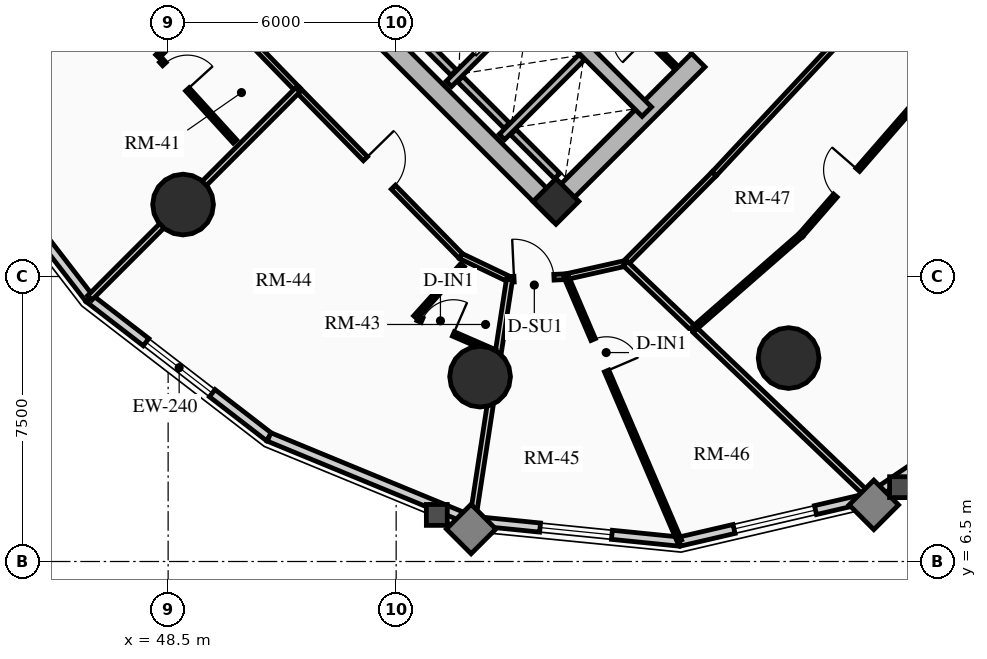
"""IFC4 building model, lengths in metres.
Left out: names, types, materials, properties, quantities, classifications, styles, units other than length and angle.
Written with IfcOpenShell. Run it as: python <this file> out.ifc"""

import sys

from ifc_helpers import new_model, si_unit, direction, frame, frame_2d, origin, origin_2d, place, context, subcontext, project, spatial, rectangle, circle, extrude, source, transform, mapped, element, fill, save


model = new_model("IFC4")
c1 = context("Model", 3, precision=1e-05, world=origin(), true_north=direction((0.0, 1.0)))
c2 = subcontext(c1, "Body", "Model", "MODEL_VIEW")
j1 = project(units=[si_unit("LENGTHUNIT", "METRE"), si_unit("PLANEANGLEUNIT", "RADIAN")], contexts=[c1])
p1 = place(None, origin())
s1 = spatial("IfcSite", under=j1, at=p1, CompositionType="ELEMENT")
p2 = place(p1, origin())
s2 = spatial("IfcBuilding", under=s1, at=p2, CompositionType="ELEMENT")
p3 = place(p2, frame((0.0, 0.0, 48.19)))
s3 = spatial("IfcBuildingStorey", under=s2, at=p3, CompositionType="ELEMENT", Elevation=48.19)
p4 = place(p3, frame((58.773, 15.661, 0.0), z_axis=(0.0, 0.0, 1.0), x_axis=(-0.707106781187, 0.707106781187, 0.0)))
e1 = element("IfcWall", 1, at=p4, inside=s3, PredefinedType="SHEAR", context=c2, shape_type="SweptSolid", body=[
    extrude(rectangle(XDim=14.3, YDim=0.5, at=frame_2d((7.15, 0.0))), origin(), (0.0, 0.0, 1.0), 2.91),
])
p5 = place(p3, frame((58.596, 15.838, 0.0), z_axis=(0.0, 0.0, 1.0), x_axis=(0.707106781187, 0.707106781187, 0.0)))
e2 = element("IfcWall", 2, at=p5, inside=s3, PredefinedType="SHEAR", context=c2, shape_type="SweptSolid", body=[
    extrude(rectangle(XDim=10.7, YDim=0.5, at=frame_2d((5.35, 0.0))), origin(), (0.0, 0.0, 1.0), 2.91),
])
m1 = source(origin(), c2, "Body", "SweptSolid", [
    extrude(rectangle(XDim=1.5, YDim=2.02, at=frame_2d((0.75, 1.01))), frame((0.0, 0.26, 0.0), z_axis=(0.0, -1.0, 0.0), x_axis=(1.0, 0.0, 0.0)), (0.0, 0.0, 1.0), 0.52),
])
p6 = place(p5, frame((5.45, 0.0, 0.0)))
e3 = element("IfcOpeningElement", 3, at=p6, cuts=e2, PredefinedType="OPENING", context=c2, shape_type="MappedRepresentation", body=[
    mapped(m1, transform((0.0, 0.0, 0.0), x_axis=(1.0, 0.0, 0.0), y_axis=(0.0, 1.0, 0.0), z_axis=(0.0, 0.0, 1.0), scale=1.0)),
])
p7 = place(p3, frame((61.096, 18.338, 0.0), z_axis=(0.0, 0.0, 1.0), x_axis=(-0.707106781187, 0.707106781187, 0.0)))
e4 = element("IfcWall", 4, at=p7, inside=s3, PredefinedType="SHEAR", context=c2, shape_type="SweptSolid", body=[
    extrude(rectangle(XDim=13.8, YDim=0.35, at=frame_2d((6.9, 0.0))), origin(), (0.0, 0.0, 1.0), 2.91),
])
m2 = source(origin(), c2, "Body", "SweptSolid", [
    extrude(rectangle(XDim=1.1, YDim=2.015, at=frame_2d((0.55, 1.007))), frame((0.0, 0.185, 0.0), z_axis=(0.0, -1.0, 0.0), x_axis=(1.0, 0.0, 0.0)), (0.0, 0.0, 1.0), 0.37),
])
p8 = place(p7, frame((4.9, 0.0, 0.0)))
e5 = element("IfcOpeningElement", 5, at=p8, cuts=e4, PredefinedType="OPENING", context=c2, shape_type="MappedRepresentation", body=[
    mapped(m2, transform((0.0, 0.0, 0.0), x_axis=(1.0, 0.0, 0.0), y_axis=(0.0, 1.0, 0.0), z_axis=(0.0, 0.0, 1.0), scale=1.0)),
])
m3 = source(origin(), c2, "Body", "SweptSolid", [
    extrude(rectangle(XDim=1.15, YDim=2.02, at=frame_2d((0.575, 1.01))), frame((0.0, 0.185, 0.0), z_axis=(0.0, -1.0, 0.0), x_axis=(1.0, 0.0, 0.0)), (0.0, 0.0, 1.0), 0.37),
])
p9 = place(p7, frame((7.32, 0.0, 0.0)))
e6 = element("IfcOpeningElement", 6, at=p9, cuts=e4, PredefinedType="OPENING", context=c2, shape_type="MappedRepresentation", body=[
    mapped(m3, transform((0.0, 0.0, 0.0), x_axis=(1.0, 0.0, 0.0), y_axis=(0.0, 1.0, 0.0), z_axis=(0.0, 0.0, 1.0), scale=1.0)),
])
p10 = place(p3, frame((58.706, 15.976, 0.0), z_axis=(0.0, 0.0, 1.0), x_axis=(0.707106781187, 0.707106781187, 0.0)))
e7 = element("IfcColumn", 7, at=p10, inside=s3, PredefinedType="COLUMN", context=c2, shape_type="SweptSolid", body=[
    extrude(rectangle(XDim=0.85, YDim=0.85, at=origin_2d()), origin(), (0.0, 0.0, 1.0), 2.91),
])
for number, where, z_axis, x_axis in (
    (8, (48.893, 15.893, 0.0), (0.0, 0.0, 1.0), (1.0, 0.0, 0.0)),
    (9, (56.709, 11.365, 0.0), (0.0, 0.0, 1.0), (1.0, 0.0, 0.0)),
    (10, (64.827, 11.854, 0.0), (0.0, 0.0, 1.0), (1.0, 0.0, 0.0)),
):
    element("IfcColumn", number, at=place(p3, frame(where, z_axis=z_axis, x_axis=x_axis)), inside=s3, PredefinedType="USERDEFINED", context=c2, shape_type="SweptSolid", body=[
        extrude(circle(Radius=0.8, at=origin_2d()), origin(), (0.0, 0.0, 1.0), 2.91),
    ])
p11 = place(p3, frame((46.425, 13.425, 0.0), z_axis=(0.0, 0.0, 1.0), x_axis=(-0.610502519057, 0.792014314407, 0.0)))
e11 = element("IfcWall", 11, at=p11, inside=s3, PredefinedType="SOLIDWALL", context=c2, shape_type="SweptSolid", body=[
    extrude(rectangle(XDim=5.973, YDim=0.24, at=frame_2d((2.987, 0.0))), origin(), (0.0, 0.0, 1.0), 2.073),
])
p12 = place(p3, frame((51.156, 9.778, 0.0), z_axis=(0.0, 0.0, 1.0), x_axis=(-0.792014314407, 0.610502519057, 0.0)))
e12 = element("IfcWall", 12, at=p12, inside=s3, PredefinedType="SOLIDWALL", context=c2, shape_type="SweptSolid", body=[
    extrude(rectangle(XDim=5.973, YDim=0.24, at=frame_2d((2.987, 0.0))), origin(), (0.0, 0.0, 1.0), 2.073),
])
m4 = source(origin(), c2, "Body", "SweptSolid", [
    extrude(rectangle(XDim=2.2, YDim=1.35, at=frame_2d((1.1, 0.675))), frame((0.0, 0.13, 0.0), z_axis=(0.0, -1.0, 0.0), x_axis=(1.0, 0.0, 0.0)), (0.0, 0.0, 1.0), 0.26),
])
p13 = place(p12, frame((1.887, 0.0, 0.65)))
e13 = element("IfcOpeningElement", 13, at=p13, cuts=e12, PredefinedType="OPENING", context=c2, shape_type="MappedRepresentation", body=[
    mapped(m4, transform((0.0, 0.0, 0.0), x_axis=(1.0, 0.0, 0.0), y_axis=(0.0, 1.0, 0.0), z_axis=(0.0, 0.0, 1.0), scale=1.0)),
])
p14 = place(p3, frame((56.507, 7.572, 0.0), z_axis=(0.0, 0.0, 1.0), x_axis=(-0.924563629567, 0.381027682565, 0.0)))
e14 = element("IfcWall", 14, at=p14, inside=s3, PredefinedType="SOLIDWALL", context=c2, shape_type="SweptSolid", body=[
    extrude(rectangle(XDim=5.789, YDim=0.24, at=frame_2d((2.894, 0.0))), origin(), (0.0, 0.0, 1.0), 2.073),
])
p15 = place(p3, frame((61.957, 7.024, 0.0), z_axis=(0.0, 0.0, 1.0), x_axis=(-0.994970765694, 0.100165739718, 0.0)))
e15 = element("IfcWall", 15, at=p15, inside=s3, PredefinedType="SOLIDWALL", context=c2, shape_type="SweptSolid", body=[
    extrude(rectangle(XDim=5.477, YDim=0.24, at=frame_2d((2.738, 0.0))), origin(), (0.0, 0.0, 1.0), 2.073),
])
m5 = source(origin(), c2, "Body", "SweptSolid", [
    extrude(rectangle(XDim=1.9, YDim=1.35, at=frame_2d((0.95, 0.675))), frame((0.0, 0.13, 0.0), z_axis=(0.0, -1.0, 0.0), x_axis=(1.0, 0.0, 0.0)), (0.0, 0.0, 1.0), 0.26),
])
p16 = place(p15, frame((1.788, 0.0, 0.65)))
e16 = element("IfcOpeningElement", 16, at=p16, cuts=e15, PredefinedType="OPENING", context=c2, shape_type="MappedRepresentation", body=[
    mapped(m5, transform((0.0, 0.0, 0.0), x_axis=(1.0, 0.0, 0.0), y_axis=(0.0, 1.0, 0.0), z_axis=(0.0, 0.0, 1.0), scale=1.0)),
])
p17 = place(p3, frame((66.969, 8.186, 0.0), z_axis=(0.0, 0.0, 1.0), x_axis=(-0.974166016949, -0.225833060959, 0.0)))
e17 = element("IfcWall", 17, at=p17, inside=s3, PredefinedType="SOLIDWALL", context=c2, shape_type="SweptSolid", body=[
    extrude(rectangle(XDim=5.146, YDim=0.24, at=frame_2d((2.573, 0.0))), origin(), (0.0, 0.0, 1.0), 2.073),
])
p18 = place(p17, frame((1.473, 0.0, 0.65)))
e18 = element("IfcOpeningElement", 18, at=p18, cuts=e17, PredefinedType="OPENING", context=c2, shape_type="MappedRepresentation", body=[
    mapped(m4, transform((0.0, 0.0, 0.0), x_axis=(1.0, 0.0, 0.0), y_axis=(0.0, 1.0, 0.0), z_axis=(0.0, 0.0, 1.0), scale=1.0)),
])
p19 = place(p3, frame((71.055, 10.945, 0.0), z_axis=(0.0, 0.0, 1.0), x_axis=(-0.828736708604, -0.559638693991, 0.0)))
e19 = element("IfcWall", 19, at=p19, inside=s3, PredefinedType="SOLIDWALL", context=c2, shape_type="SweptSolid", body=[
    extrude(rectangle(XDim=4.93, YDim=0.24, at=frame_2d((2.465, 0.0))), origin(), (0.0, 0.0, 1.0), 2.073),
])
p20 = place(p3, frame((55.888, 19.069, 0.0), z_axis=(0.0, 0.0, 1.0), x_axis=(0.707106781187, 0.707106781187, 0.0)))
e20 = element("IfcWall", 20, at=p20, inside=s3, PredefinedType="SHEAR", context=c2, shape_type="SweptSolid", body=[
    extrude(rectangle(XDim=2.97, YDim=0.2, at=frame_2d((1.485, 0.0))), origin(), (0.0, 0.0, 1.0), 2.91),
])
p21 = place(p3, frame((56.015, 19.366, 0.0), z_axis=(0.0, 0.0, 1.0), x_axis=(-0.707106781187, 0.707106781187, 0.0)))
e21 = element("IfcWall", 21, at=p21, inside=s3, PredefinedType="SHEAR", context=c2, shape_type="SweptSolid", body=[
    extrude(rectangle(XDim=2.44, YDim=0.2, at=frame_2d((1.22, 0.0))), origin(), (0.0, 0.0, 1.0), 2.91),
])
p22 = place(p3, frame((57.284, 17.673, 0.0), z_axis=(0.0, 0.0, 1.0), x_axis=(0.707147878904, 0.70706568108, 0.0)))
e22 = element("IfcWall", 22, at=p22, inside=s3, PredefinedType="SHEAR", context=c2, shape_type="SweptSolid", body=[
    extrude(rectangle(XDim=2.97, YDim=0.2, at=frame_2d((1.485, 0.0))), origin(), (0.0, 0.0, 1.0), 2.91),
])
p23 = place(p3, frame((57.412, 17.97, 0.0), z_axis=(0.0, 0.0, 1.0), x_axis=(-0.707106781187, 0.707106781187, 0.0)))
e23 = element("IfcWall", 23, at=p23, inside=s3, PredefinedType="SHEAR", context=c2, shape_type="SweptSolid", body=[
    extrude(rectangle(XDim=1.735, YDim=0.2, at=frame_2d((0.867, 0.0))), origin(), (0.0, 0.0, 1.0), 2.91),
])
p24 = place(p3, frame((58.737, 16.644, 0.0), z_axis=(0.0, 0.0, 1.0), x_axis=(-0.707032117043, 0.707181437447, 0.0)))
e24 = element("IfcWall", 24, at=p24, inside=s3, PredefinedType="SHEAR", context=c2, shape_type="SweptSolid", body=[
    extrude(rectangle(XDim=1.635, YDim=0.2, at=frame_2d((0.817, 0.0))), origin(), (0.0, 0.0, 1.0), 2.91),
])
p25 = place(p3, frame((61.835, 19.529, 0.0), z_axis=(0.0, 0.0, 1.0), x_axis=(-0.707146413884, 0.707067146267, 0.0)))
e25 = element("IfcWall", 25, at=p25, inside=s3, PredefinedType="PARTITIONING", context=c2, shape_type="SweptSolid", body=[
    extrude(rectangle(XDim=3.08, YDim=0.125, at=frame_2d((1.54, 0.0))), origin(), (0.0, 0.0, 1.0), 2.635),
])
m6 = source(origin(), c2, "Body", "SweptSolid", [
    extrude(rectangle(XDim=0.9, YDim=2.005, at=frame_2d((0.45, 1.002))), frame((0.0, 0.073, 0.0), z_axis=(0.0, -1.0, 0.0), x_axis=(1.0, 0.0, 0.0)), (0.0, 0.0, 1.0), 0.145),
])
p26 = place(p25, frame((1.05, 0.0, 0.0)))
e26 = element("IfcOpeningElement", 26, at=p26, cuts=e25, PredefinedType="OPENING", context=c2, shape_type="MappedRepresentation", body=[
    mapped(m6, transform((0.0, 0.0, 0.0), x_axis=(1.0, 0.0, 0.0), y_axis=(0.0, 1.0, 0.0), z_axis=(0.0, 0.0, 1.0), scale=1.0)),
])
p27 = place(p3, frame((47.729, 23.23, 0.0), z_axis=(0.0, 0.0, 1.0), x_axis=(0.696119834292, -0.717925606386, 0.0)))
e27 = element("IfcWall", 27, at=p27, inside=s3, PredefinedType="PARTITIONING", context=c2, shape_type="SweptSolid", body=[
    extrude(rectangle(XDim=6.012, YDim=0.15, at=frame_2d((3.006, 0.0))), origin(), (0.0, 0.0, 1.0), 2.635),
])
p28 = place(p3, frame((51.914, 18.914, 0.0), z_axis=(0.0, 0.0, 1.0), x_axis=(0.6999614951, -0.71418058317, 0.0)))
e28 = element("IfcWall", 28, at=p28, inside=s3, PredefinedType="PARTITIONING", context=c2, shape_type="SweptSolid", body=[
    extrude(rectangle(XDim=6.13, YDim=0.15, at=frame_2d((3.065, 0.0))), origin(), (0.0, 0.0, 1.0), 2.159),
])
m7 = source(origin(), c2, "Body", "SweptSolid", [
    extrude(rectangle(XDim=1.05, YDim=2.015, at=frame_2d((0.525, 1.007))), frame((0.0, 0.085, 0.0), z_axis=(0.0, -1.0, 0.0), x_axis=(1.0, 0.0, 0.0)), (0.0, 0.0, 1.0), 0.17),
])
p29 = place(p28, frame((2.54, 0.0, 0.0)))
e29 = element("IfcOpeningElement", 29, at=p29, cuts=e28, PredefinedType="OPENING", context=c2, shape_type="MappedRepresentation", body=[
    mapped(m7, transform((0.0, 0.0, 0.0), x_axis=(1.0, 0.0, 0.0), y_axis=(0.0, 1.0, 0.0), z_axis=(0.0, 0.0, 1.0), scale=1.0)),
])
p30 = place(p3, frame((56.204, 14.536, 0.0), z_axis=(0.0, 0.0, 1.0), x_axis=(0.902244982981, -0.431223828986, 0.0)))
e30 = element("IfcWall", 30, at=p30, inside=s3, PredefinedType="PARTITIONING", context=c2, shape_type="SweptSolid", body=[
    extrude(rectangle(XDim=1.417, YDim=0.15, at=frame_2d((0.708, 0.0))), origin(), (0.0, 0.0, 1.0), 2.205),
])
p31 = place(p3, frame((57.483, 13.925, 0.0), z_axis=(0.0, 0.0, 1.0), x_axis=(0.998884345706, 0.047223552414, 0.0)))
e31 = element("IfcWall", 31, at=p31, inside=s3, PredefinedType="PARTITIONING", context=c2, shape_type="SweptSolid", body=[
    extrude(rectangle(XDim=1.494, YDim=0.15, at=frame_2d((0.747, 0.0))), origin(), (0.0, 0.0, 1.0), 2.159),
])
p32 = place(p31, frame((0.12, 0.0, 0.0)))
e32 = element("IfcOpeningElement", 32, at=p32, cuts=e31, PredefinedType="OPENING", context=c2, shape_type="MappedRepresentation", body=[
    mapped(m7, transform((0.0, 0.0, 0.0), x_axis=(1.0, 0.0, 0.0), y_axis=(0.0, 1.0, 0.0), z_axis=(0.0, 0.0, 1.0), scale=1.0)),
])
p33 = place(p3, frame((58.975, 13.996, 0.0), z_axis=(0.0, 0.0, 1.0), x_axis=(0.975700857392, 0.219106907431, 0.0)))
e33 = element("IfcWall", 33, at=p33, inside=s3, PredefinedType="PARTITIONING", context=c2, shape_type="SweptSolid", body=[
    extrude(rectangle(XDim=1.591, YDim=0.15, at=frame_2d((0.795, 0.0))), origin(), (0.0, 0.0, 1.0), 2.205),
])
p34 = place(p3, frame((60.528, 14.344, 0.0), z_axis=(0.0, 0.0, 1.0), x_axis=(0.704381645997, 0.709821454158, 0.0)))
e34 = element("IfcWall", 34, at=p34, inside=s3, PredefinedType="PARTITIONING", context=c2, shape_type="SweptSolid", body=[
    extrude(rectangle(XDim=3.321, YDim=0.15, at=frame_2d((1.661, 0.0))), origin(), (0.0, 0.0, 1.0), 2.159),
])
p35 = place(p3, frame((62.867, 16.702, 0.0), z_axis=(0.0, 0.0, 1.0), x_axis=(0.682449206191, 0.73093302085, 0.0)))
e35 = element("IfcWall", 35, at=p35, inside=s3, PredefinedType="PARTITIONING", context=c2, shape_type="SweptSolid", body=[
    extrude(rectangle(XDim=6.642, YDim=0.15, at=frame_2d((3.321, 0.0))), origin(), (0.0, 0.0, 1.0), 2.159),
])
p36 = place(p3, frame((51.914, 18.914, 0.0), z_axis=(0.0, 0.0, 1.0), x_axis=(-0.707106781187, -0.707106781187, 0.0)))
e36 = element("IfcWall", 36, at=p36, inside=s3, PredefinedType="PARTITIONING", context=c2, shape_type="SweptSolid", body=[
    extrude(rectangle(XDim=7.743, YDim=0.16, at=frame_2d((3.872, 0.0))), origin(), (0.0, 0.0, 1.0), 2.073),
])
p37 = place(p3, frame((57.483, 13.925, 0.0), z_axis=(0.0, 0.0, 1.0), x_axis=(-0.151762268519, -0.988417024264, 0.0)))
e37 = element("IfcWall", 37, at=p37, inside=s3, PredefinedType="PARTITIONING", context=c2, shape_type="SweptSolid", body=[
    extrude(rectangle(XDim=6.407, YDim=0.16, at=frame_2d((3.204, 0.0))), origin(), (0.0, 0.0, 1.0), 2.073),
])
p38 = place(p3, frame((60.528, 14.344, 0.0), z_axis=(0.0, 0.0, 1.0), x_axis=(0.723320016743, -0.690512963947, 0.0)))
e38 = element("IfcWall", 38, at=p38, inside=s3, PredefinedType="PARTITIONING", context=c2, shape_type="SweptSolid", body=[
    extrude(rectangle(XDim=8.893, YDim=0.16, at=frame_2d((4.446, 0.0))), origin(), (0.0, 0.0, 1.0), 2.073),
])
p39 = place(p3, frame((49.498, 21.087, 0.0), z_axis=(0.0, 0.0, 1.0), x_axis=(-0.702129708151, -0.71204906638, 0.0)))
e39 = element("IfcWall", 39, at=p39, inside=s3, PredefinedType="PARTITIONING", context=c2, shape_type="SweptSolid", body=[
    extrude(rectangle(XDim=1.821, YDim=0.125, at=frame_2d((0.911, 0.0))), origin(), (0.0, 0.0, 1.0), 2.635),
])
p40 = place(p3, frame((48.32, 19.68, 0.0), z_axis=(0.0, 0.0, 1.0), x_axis=(0.673403410236, -0.739275217414, 0.0)))
e40 = element("IfcWall", 40, at=p40, inside=s3, PredefinedType="PARTITIONING", context=c2, shape_type="SweptSolid", body=[
    extrude(rectangle(XDim=2.876, YDim=0.125, at=frame_2d((1.438, 0.0))), origin(), (0.0, 0.0, 1.0), 2.635),
])
p41 = place(p40, frame((0.12, 0.0, 0.0)))
e41 = element("IfcOpeningElement", 41, at=p41, cuts=e40, PredefinedType="OPENING", context=c2, shape_type="MappedRepresentation", body=[
    mapped(m6, transform((0.0, 0.0, 0.0), x_axis=(1.0, 0.0, 0.0), y_axis=(0.0, 1.0, 0.0), z_axis=(0.0, 0.0, 1.0), scale=1.0)),
])
p42 = place(p3, frame((56.249, 14.302, 0.0), z_axis=(0.0, 0.0, 1.0), x_axis=(-0.669226451819, -0.743058514645, 0.0)))
e42 = element("IfcWall", 42, at=p42, inside=s3, PredefinedType="PARTITIONING", context=c2, shape_type="SweptSolid", body=[
    extrude(rectangle(XDim=1.855, YDim=0.125, at=frame_2d((0.927, 0.0))), origin(), (0.0, 0.0, 1.0), 2.205),
])
p43 = place(p3, frame((55.071, 12.896, 0.0), z_axis=(0.0, 0.0, 1.0), x_axis=(0.916939896123, -0.399025346184, 0.0)))
e43 = element("IfcWall", 43, at=p43, inside=s3, PredefinedType="PARTITIONING", context=c2, shape_type="SweptSolid", body=[
    extrude(rectangle(XDim=2.208, YDim=0.125, at=frame_2d((1.104, 0.0))), origin(), (0.0, 0.0, 1.0), 2.159),
])
p44 = place(p43, frame((0.12, 0.0, 0.0)))
e44 = element("IfcOpeningElement", 44, at=p44, cuts=e43, PredefinedType="OPENING", context=c2, shape_type="MappedRepresentation", body=[
    mapped(m6, transform((0.0, 0.0, 0.0), x_axis=(1.0, 0.0, 0.0), y_axis=(0.0, 1.0, 0.0), z_axis=(0.0, 0.0, 1.0), scale=1.0)),
])
p45 = place(p3, frame((58.975, 13.996, 0.0), z_axis=(0.0, 0.0, 1.0), x_axis=(0.393755664375, -0.919215141723, 0.0)))
e45 = element("IfcWall", 45, at=p45, inside=s3, PredefinedType="PARTITIONING", context=c2, shape_type="SweptSolid", body=[
    extrude(rectangle(XDim=7.563, YDim=0.125, at=frame_2d((3.782, 0.0))), origin(), (0.0, 0.0, 1.0), 2.073),
])
p46 = place(p45, frame((1.8, 0.0, 0.0)))
e46 = element("IfcOpeningElement", 46, at=p46, cuts=e45, PredefinedType="OPENING", context=c2, shape_type="MappedRepresentation", body=[
    mapped(m6, transform((0.0, 0.0, 0.0), x_axis=(1.0, 0.0, 0.0), y_axis=(0.0, 1.0, 0.0), z_axis=(0.0, 0.0, 1.0), scale=1.0)),
])
p47 = place(p3, frame((62.329, 12.625, 0.0), z_axis=(0.0, 0.0, 1.0), x_axis=(0.753237140985, 0.657749047465, 0.0)))
e47 = element("IfcWall", 47, at=p47, inside=s3, PredefinedType="PARTITIONING", context=c2, shape_type="SweptSolid", body=[
    extrude(rectangle(XDim=3.753, YDim=0.125, at=frame_2d((1.877, 0.0))), origin(), (0.0, 0.0, 1.0), 2.159),
])
p48 = place(p3, frame((65.156, 15.094, 0.0), z_axis=(0.0, 0.0, 1.0), x_axis=(0.656356662483, 0.754450748302, 0.0)))
e48 = element("IfcWall", 48, at=p48, inside=s3, PredefinedType="PARTITIONING", context=c2, shape_type="SweptSolid", body=[
    extrude(rectangle(XDim=6.147, YDim=0.125, at=frame_2d((3.074, 0.0))), origin(), (0.0, 0.0, 1.0), 2.159),
])
p49 = place(p48, frame((1.372, 0.0, 0.0)))
e49 = element("IfcOpeningElement", 49, at=p49, cuts=e48, PredefinedType="OPENING", context=c2, shape_type="MappedRepresentation", body=[
    mapped(m6, transform((0.0, 0.0, 0.0), x_axis=(1.0, 0.0, 0.0), y_axis=(0.0, 1.0, 0.0), z_axis=(0.0, 0.0, 1.0), scale=1.0)),
])
m8 = source(origin(), c2, "Body", "SweptSolid", [
    extrude(rectangle(XDim=2.2, YDim=1.35, at=frame_2d((1.1, 0.675))), frame((0.0, 0.03, 0.0), z_axis=(0.0, -1.0, 0.0), x_axis=(1.0, 0.0, 0.0)), (0.0, 0.0, 1.0), 0.06),
])
p50 = place(p13, origin())
e50 = element("IfcWindow", 50, at=p50, inside=s3, PartitioningType="DOUBLE_PANEL_VERTICAL", PredefinedType="WINDOW", context=c2, shape_type="MappedRepresentation", body=[
    mapped(m8, transform((0.0, 0.0, 0.0), x_axis=(1.0, 0.0, 0.0), y_axis=(0.0, 1.0, 0.0), z_axis=(0.0, 0.0, 1.0), scale=1.0)),
])
fill(e13, e50)
m9 = source(origin(), c2, "Body", "SweptSolid", [
    extrude(rectangle(XDim=1.9, YDim=1.35, at=frame_2d((0.95, 0.675))), frame((0.0, 0.03, 0.0), z_axis=(0.0, -1.0, 0.0), x_axis=(1.0, 0.0, 0.0)), (0.0, 0.0, 1.0), 0.06),
])
p51 = place(p16, origin())
e51 = element("IfcWindow", 51, at=p51, inside=s3, PartitioningType="DOUBLE_PANEL_VERTICAL", PredefinedType="WINDOW", context=c2, shape_type="MappedRepresentation", body=[
    mapped(m9, transform((0.0, 0.0, 0.0), x_axis=(1.0, 0.0, 0.0), y_axis=(0.0, 1.0, 0.0), z_axis=(0.0, 0.0, 1.0), scale=1.0)),
])
fill(e16, e51)
p52 = place(p18, origin())
e52 = element("IfcWindow", 52, at=p52, inside=s3, PartitioningType="DOUBLE_PANEL_VERTICAL", PredefinedType="WINDOW", context=c2, shape_type="MappedRepresentation", body=[
    mapped(m8, transform((0.0, 0.0, 0.0), x_axis=(1.0, 0.0, 0.0), y_axis=(0.0, 1.0, 0.0), z_axis=(0.0, 0.0, 1.0), scale=1.0)),
])
fill(e18, e52)
m10 = source(origin(), c2, "Body", "SweptSolid", [
    extrude(rectangle(XDim=1.5, YDim=2.02, at=frame_2d((0.75, 1.01))), frame((0.0, 0.025, 0.0), z_axis=(0.0, -1.0, 0.0), x_axis=(1.0, 0.0, 0.0)), (0.0, 0.0, 1.0), 0.05),
])
p53 = place(p6, origin())
e53 = element("IfcDoor", 53, at=p53, inside=s3, OperationType="DOUBLE_DOOR_SINGLE_SWING", PredefinedType="DOOR", context=c2, shape_type="MappedRepresentation", body=[
    mapped(m10, transform((0.0, 0.0, 0.0), x_axis=(1.0, 0.0, 0.0), y_axis=(0.0, 1.0, 0.0), z_axis=(0.0, 0.0, 1.0), scale=1.0)),
])
fill(e3, e53)
m11 = source(origin(), c2, "Body", "SweptSolid", [
    extrude(rectangle(XDim=0.9, YDim=2.005, at=frame_2d((0.45, 1.002))), frame((0.0, 0.025, 0.0), z_axis=(0.0, -1.0, 0.0), x_axis=(1.0, 0.0, 0.0)), (0.0, 0.0, 1.0), 0.05),
])
p54 = place(p41, origin())
e54 = element("IfcDoor", 54, at=p54, inside=s3, OperationType="SINGLE_SWING_RIGHT", PredefinedType="DOOR", context=c2, shape_type="MappedRepresentation", body=[
    mapped(m11, transform((0.0, 0.0, 0.0), x_axis=(1.0, 0.0, 0.0), y_axis=(0.0, 1.0, 0.0), z_axis=(0.0, 0.0, 1.0), scale=1.0)),
])
fill(e41, e54)
m12 = source(origin(), c2, "Body", "SweptSolid", [
    extrude(rectangle(XDim=1.05, YDim=2.015, at=frame_2d((0.525, 1.007))), frame((0.0, 0.025, 0.0), z_axis=(0.0, -1.0, 0.0), x_axis=(1.0, 0.0, 0.0)), (0.0, 0.0, 1.0), 0.05),
])
p55 = place(p29, origin())
e55 = element("IfcDoor", 55, at=p55, inside=s3, OperationType="SINGLE_SWING_LEFT", PredefinedType="DOOR", context=c2, shape_type="MappedRepresentation", body=[
    mapped(m12, transform((0.0, 0.0, 0.0), x_axis=(1.0, 0.0, 0.0), y_axis=(0.0, 1.0, 0.0), z_axis=(0.0, 0.0, 1.0), scale=1.0)),
])
fill(e29, e55)
p56 = place(p44, origin())
e56 = element("IfcDoor", 56, at=p56, inside=s3, OperationType="SINGLE_SWING_RIGHT", PredefinedType="DOOR", context=c2, shape_type="MappedRepresentation", body=[
    mapped(m11, transform((0.0, 0.0, 0.0), x_axis=(1.0, 0.0, 0.0), y_axis=(0.0, 1.0, 0.0), z_axis=(0.0, 0.0, 1.0), scale=1.0)),
])
fill(e44, e56)
p57 = place(p32, origin())
e57 = element("IfcDoor", 57, at=p57, inside=s3, OperationType="SINGLE_SWING_LEFT", PredefinedType="DOOR", context=c2, shape_type="MappedRepresentation", body=[
    mapped(m12, transform((0.0, 0.0, 0.0), x_axis=(1.0, 0.0, 0.0), y_axis=(0.0, 1.0, 0.0), z_axis=(0.0, 0.0, 1.0), scale=1.0)),
])
fill(e32, e57)
p58 = place(p46, origin())
e58 = element("IfcDoor", 58, at=p58, inside=s3, OperationType="SINGLE_SWING_RIGHT", PredefinedType="DOOR", context=c2, shape_type="MappedRepresentation", body=[
    mapped(m11, transform((0.0, 0.0, 0.0), x_axis=(1.0, 0.0, 0.0), y_axis=(0.0, 1.0, 0.0), z_axis=(0.0, 0.0, 1.0), scale=1.0)),
])
fill(e46, e58)
p59 = place(p49, origin())
e59 = element("IfcDoor", 59, at=p59, inside=s3, OperationType="SINGLE_SWING_RIGHT", PredefinedType="DOOR", context=c2, shape_type="MappedRepresentation", body=[
    mapped(m11, transform((0.0, 0.0, 0.0), x_axis=(1.0, 0.0, 0.0), y_axis=(0.0, 1.0, 0.0), z_axis=(0.0, 0.0, 1.0), scale=1.0)),
])
fill(e49, e59)
save(model, sys.argv[1])
